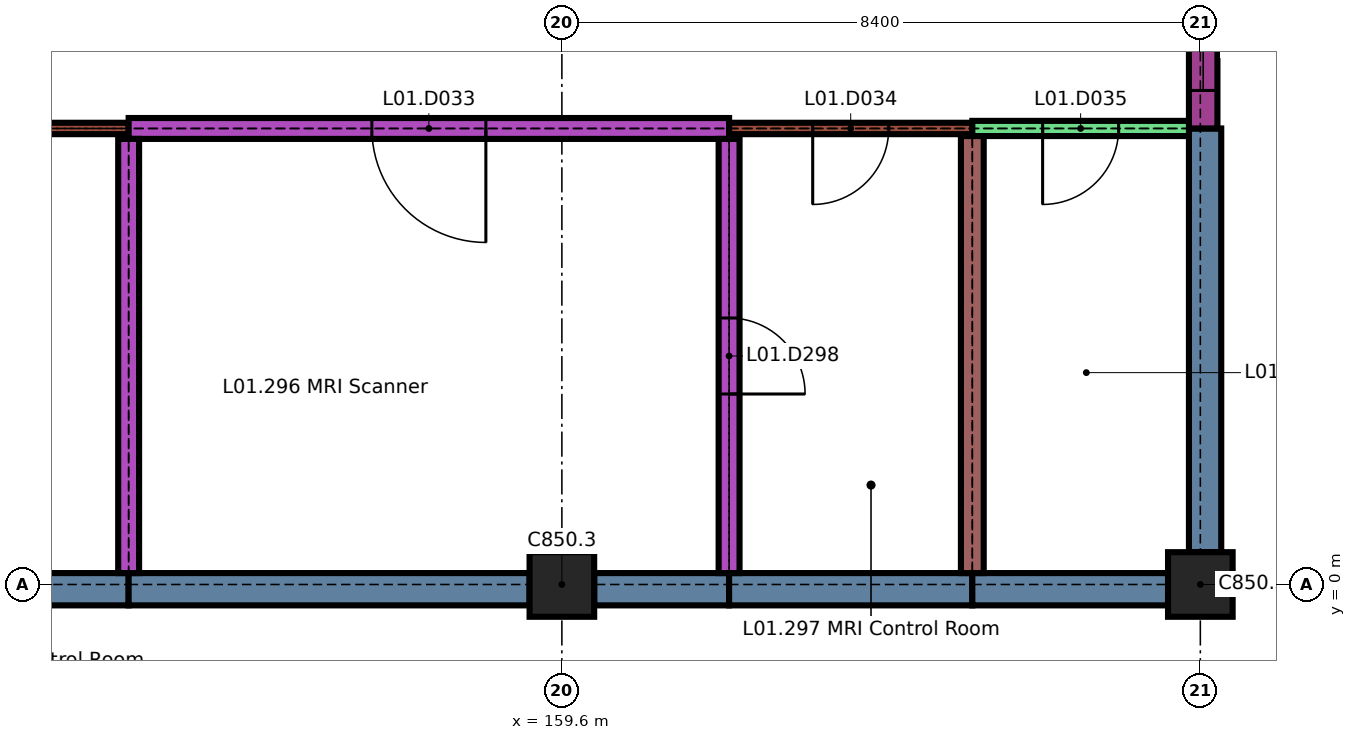
"""IFC4 building model, lengths in metres.
Left out: names, types, materials, properties, quantities, classifications, styles, units other than length and angle.
Written with IfcOpenShell. Run it as: python <this file> out.ifc"""

import sys

from ifc_helpers import new_model, si_unit, direction, frame, frame_2d, origin, origin_2d, place, context, subcontext, project, spatial, rectangle, extrude, element, fill, save


model = new_model("IFC4")
c1 = context("Model", 3, precision=1e-05, world=origin(), true_north=direction((0.0, 1.0)))
c2 = subcontext(c1, "Body", "Model", "MODEL_VIEW")
j1 = project(units=[si_unit("LENGTHUNIT", "METRE"), si_unit("PLANEANGLEUNIT", "RADIAN")], contexts=[c1])
p1 = place(None, origin())
s1 = spatial("IfcSite", under=j1, at=p1, CompositionType="ELEMENT")
p2 = place(p1, origin())
s2 = spatial("IfcBuilding", under=s1, at=p2, CompositionType="ELEMENT")
p3 = place(p2, frame((0.0, 0.0, 4.5)))
s3 = spatial("IfcBuildingStorey", under=s2, at=p3, CompositionType="ELEMENT", Elevation=4.5)
for number, where, z_axis, x_axis in (
    (1, (159.6, 0.0, 0.0), (0.0, 0.0, 1.0), (1.0, 0.0, 0.0)),
    (2, (168.0, 0.0, 0.0), (0.0, 0.0, 1.0), (1.0, 0.0, 0.0)),
):
    element("IfcColumn", number, at=place(p3, frame(where, z_axis=z_axis, x_axis=x_axis)), inside=s3, PredefinedType="COLUMN", context=c2, shape_type="SweptSolid", body=[
        extrude(rectangle(XDim=0.85, YDim=0.85, at=origin_2d()), origin(), (0.0, 0.0, 1.0), 3.45),
    ])
p4 = place(p3, frame((151.625, -0.062, 0.0), z_axis=(0.0, 0.0, 1.0), x_axis=(1.0, 0.0, 0.0)))
e3 = element("IfcWall", 3, at=p4, inside=s3, PredefinedType="SOLIDWALL", context=c2, shape_type="SweptSolid", body=[
    extrude(rectangle(XDim=2.275, YDim=0.425, at=frame_2d((1.137, 0.0))), origin(), (0.0, 0.0, 1.0), 3.15),
])
p5 = place(p3, frame((153.9, -0.062, 0.0), z_axis=(0.0, 0.0, 1.0), x_axis=(1.0, 0.0, 0.0)))
e4 = element("IfcWall", 4, at=p5, inside=s3, PredefinedType="SOLIDWALL", context=c2, shape_type="SweptSolid", body=[
    extrude(rectangle(XDim=5.275, YDim=0.425, at=frame_2d((2.638, 0.0))), origin(), (0.0, 0.0, 1.0), 3.15),
])
p6 = place(p3, frame((160.025, -0.062, 0.0), z_axis=(0.0, 0.0, 1.0), x_axis=(1.0, 0.0, 0.0)))
e5 = element("IfcWall", 5, at=p6, inside=s3, PredefinedType="SOLIDWALL", context=c2, shape_type="SweptSolid", body=[
    extrude(rectangle(XDim=1.775, YDim=0.425, at=frame_2d((0.888, 0.0))), origin(), (0.0, 0.0, 1.0), 3.15),
])
p7 = place(p3, frame((161.8, -0.062, 0.0), z_axis=(0.0, 0.0, 1.0), x_axis=(1.0, 0.0, 0.0)))
e6 = element("IfcWall", 6, at=p7, inside=s3, PredefinedType="SOLIDWALL", context=c2, shape_type="SweptSolid", body=[
    extrude(rectangle(XDim=3.2, YDim=0.425, at=frame_2d((1.6, 0.0))), origin(), (0.0, 0.0, 1.0), 3.15),
])
p8 = place(p3, frame((165.0, -0.062, 0.0), z_axis=(0.0, 0.0, 1.0), x_axis=(1.0, 0.0, 0.0)))
e7 = element("IfcWall", 7, at=p8, inside=s3, PredefinedType="SOLIDWALL", context=c2, shape_type="SweptSolid", body=[
    extrude(rectangle(XDim=2.575, YDim=0.425, at=frame_2d((1.288, 0.0))), origin(), (0.0, 0.0, 1.0), 3.15),
])
p9 = place(p3, frame((168.062, 0.425, 0.0), z_axis=(0.0, 0.0, 1.0), x_axis=(0.0, 1.0, 0.0)))
e8 = element("IfcWall", 8, at=p9, inside=s3, PredefinedType="SOLIDWALL", context=c2, shape_type="SweptSolid", body=[
    extrude(rectangle(XDim=5.575, YDim=0.425, at=frame_2d((2.788, 0.0))), origin(), (0.0, 0.0, 1.0), 3.15),
])
p10 = place(p3, frame((168.038, 6.0, 0.0), z_axis=(0.0, 0.0, 1.0), x_axis=(0.0, 1.0, 0.0)))
e9 = element("IfcWall", 9, at=p10, inside=s3, PredefinedType="SOLIDWALL", context=c2, shape_type="SweptSolid", body=[
    extrude(rectangle(XDim=1.975, YDim=0.375, at=frame_2d((0.988, 0.0))), origin(), (0.0, 0.0, 1.0), 3.15),
])
p11 = place(p10, frame((0.5, 0.0, 0.9)))
e10 = element("IfcOpeningElement", 10, at=p11, cuts=e9, PredefinedType="OPENING", context=c2, shape_type="SweptSolid", body=[
    extrude(rectangle(XDim=1.2, YDim=1.5, at=frame_2d((0.6, 0.75))), frame((0.0, 0.198, 0.0), z_axis=(0.0, -1.0, 0.0), x_axis=(1.0, 0.0, 0.0)), (0.0, 0.0, 1.0), 0.395),
])
p12 = place(p3, frame((150.3, 6.0, 0.0), z_axis=(0.0, 0.0, 1.0), x_axis=(1.0, 0.0, 0.0)))
e11 = element("IfcWall", 11, at=p12, inside=s3, PredefinedType="PARTITIONING", context=c2, shape_type="SweptSolid", body=[
    extrude(rectangle(XDim=3.6, YDim=0.15, at=frame_2d((1.8, 0.0))), origin(), (0.0, 0.0, 1.0), 3.45),
])
p13 = place(p12, frame((1.3, 0.0, 0.0)))
e12 = element("IfcOpeningElement", 12, at=p13, cuts=e11, PredefinedType="OPENING", context=c2, shape_type="SweptSolid", body=[
    extrude(rectangle(XDim=1.0, YDim=2.1, at=frame_2d((0.5, 1.05))), frame((0.0, 0.085, 0.0), z_axis=(0.0, -1.0, 0.0), x_axis=(1.0, 0.0, 0.0)), (0.0, 0.0, 1.0), 0.17),
])
p14 = place(p3, frame((153.9, 6.0, 0.0), z_axis=(0.0, 0.0, 1.0), x_axis=(1.0, 0.0, 0.0)))
e13 = element("IfcWall", 13, at=p14, inside=s3, PredefinedType="SOLIDWALL", context=c2, shape_type="SweptSolid", body=[
    extrude(rectangle(XDim=7.9, YDim=0.275, at=frame_2d((3.95, 0.0))), origin(), (0.0, 0.0, 1.0), 3.45),
])
p15 = place(p14, frame((3.2, 0.0, 0.0)))
e14 = element("IfcOpeningElement", 14, at=p15, cuts=e13, PredefinedType="OPENING", context=c2, shape_type="SweptSolid", body=[
    extrude(rectangle(XDim=1.5, YDim=2.4, at=frame_2d((0.75, 1.2))), frame((0.0, 0.147, 0.0), z_axis=(0.0, -1.0, 0.0), x_axis=(1.0, 0.0, 0.0)), (0.0, 0.0, 1.0), 0.295),
])
p16 = place(p3, frame((161.8, 6.0, 0.0), z_axis=(0.0, 0.0, 1.0), x_axis=(1.0, 0.0, 0.0)))
e15 = element("IfcWall", 15, at=p16, inside=s3, PredefinedType="PARTITIONING", context=c2, shape_type="SweptSolid", body=[
    extrude(rectangle(XDim=3.2, YDim=0.15, at=frame_2d((1.6, 0.0))), origin(), (0.0, 0.0, 1.0), 3.45),
])
p17 = place(p16, frame((1.1, 0.0, 0.0)))
e16 = element("IfcOpeningElement", 16, at=p17, cuts=e15, PredefinedType="OPENING", context=c2, shape_type="SweptSolid", body=[
    extrude(rectangle(XDim=1.0, YDim=2.1, at=frame_2d((0.5, 1.05))), frame((0.0, 0.085, 0.0), z_axis=(0.0, -1.0, 0.0), x_axis=(1.0, 0.0, 0.0)), (0.0, 0.0, 1.0), 0.17),
])
p18 = place(p3, frame((165.0, 6.0, 0.0), z_axis=(0.0, 0.0, 1.0), x_axis=(1.0, 0.0, 0.0)))
e17 = element("IfcWall", 17, at=p18, inside=s3, PredefinedType="SOLIDWALL", context=c2, shape_type="SweptSolid", body=[
    extrude(rectangle(XDim=2.85, YDim=0.2, at=frame_2d((1.425, 0.0))), origin(), (0.0, 0.0, 1.0), 3.45),
])
p19 = place(p18, frame((0.925, 0.0, 0.0)))
e18 = element("IfcOpeningElement", 18, at=p19, cuts=e17, PredefinedType="OPENING", context=c2, shape_type="SweptSolid", body=[
    extrude(rectangle(XDim=1.0, YDim=2.1, at=frame_2d((0.5, 1.05))), frame((0.0, 0.11, 0.0), z_axis=(0.0, -1.0, 0.0), x_axis=(1.0, 0.0, 0.0)), (0.0, 0.0, 1.0), 0.22),
])
p20 = place(p3, frame((153.9, 0.15, 0.0), z_axis=(0.0, 0.0, 1.0), x_axis=(0.0, 1.0, 0.0)))
e19 = element("IfcWall", 19, at=p20, inside=s3, PredefinedType="SOLIDWALL", context=c2, shape_type="SweptSolid", body=[
    extrude(rectangle(XDim=5.713, YDim=0.275, at=frame_2d((2.856, 0.0))), origin(), (0.0, 0.0, 1.0), 3.45),
])
p21 = place(p3, frame((161.8, 0.15, 0.0), z_axis=(0.0, 0.0, 1.0), x_axis=(0.0, 1.0, 0.0)))
e20 = element("IfcWall", 20, at=p21, inside=s3, PredefinedType="SOLIDWALL", context=c2, shape_type="SweptSolid", body=[
    extrude(rectangle(XDim=5.713, YDim=0.275, at=frame_2d((2.856, 0.0))), origin(), (0.0, 0.0, 1.0), 3.45),
])
p22 = place(p21, frame((2.356, 0.0, 0.0)))
e21 = element("IfcOpeningElement", 21, at=p22, cuts=e20, PredefinedType="OPENING", context=c2, shape_type="SweptSolid", body=[
    extrude(rectangle(XDim=1.0, YDim=2.1, at=frame_2d((0.5, 1.05))), frame((0.0, 0.147, 0.0), z_axis=(0.0, -1.0, 0.0), x_axis=(1.0, 0.0, 0.0)), (0.0, 0.0, 1.0), 0.295),
])
p23 = place(p3, frame((165.0, 0.15, 0.0), z_axis=(0.0, 0.0, 1.0), x_axis=(0.0, 1.0, 0.0)))
e22 = element("IfcWall", 22, at=p23, inside=s3, PredefinedType="SOLIDWALL", context=c2, shape_type="SweptSolid", body=[
    extrude(rectangle(XDim=5.75, YDim=0.3, at=frame_2d((2.875, 0.0))), origin(), (0.0, 0.0, 1.0), 3.45),
])
p24 = place(p11, origin())
e23 = element("IfcWindow", 23, at=p24, inside=s3, PartitioningType="SINGLE_PANEL", PredefinedType="WINDOW", context=c2, shape_type="SweptSolid", body=[
    extrude(rectangle(XDim=1.2, YDim=1.5, at=frame_2d((0.6, 0.75))), frame((0.0, 0.03, 0.0), z_axis=(0.0, -1.0, 0.0), x_axis=(1.0, 0.0, 0.0)), (0.0, 0.0, 1.0), 0.06),
])
fill(e10, e23)
p25 = place(p15, origin())
e24 = element("IfcDoor", 24, at=p25, inside=s3, OperationType="SINGLE_SWING_RIGHT", PredefinedType="DOOR", context=c2, shape_type="SweptSolid", body=[
    extrude(rectangle(XDim=1.5, YDim=2.4, at=frame_2d((0.75, 1.2))), frame((0.0, 0.045, 0.0), z_axis=(0.0, -1.0, 0.0), x_axis=(1.0, 0.0, 0.0)), (0.0, 0.0, 1.0), 0.09),
])
fill(e14, e24)
p26 = place(p17, origin())
e25 = element("IfcDoor", 25, at=p26, inside=s3, OperationType="SINGLE_SWING_LEFT", PredefinedType="DOOR", context=c2, shape_type="SweptSolid", body=[
    extrude(rectangle(XDim=1.0, YDim=2.1, at=frame_2d((0.5, 1.05))), frame((0.0, 0.025, 0.0), z_axis=(0.0, -1.0, 0.0), x_axis=(1.0, 0.0, 0.0)), (0.0, 0.0, 1.0), 0.05),
])
fill(e16, e25)
p27 = place(p19, origin())
e26 = element("IfcDoor", 26, at=p27, inside=s3, OperationType="SINGLE_SWING_LEFT", PredefinedType="DOOR", context=c2, shape_type="SweptSolid", body=[
    extrude(rectangle(XDim=1.0, YDim=2.1, at=frame_2d((0.5, 1.05))), frame((0.0, 0.025, 0.0), z_axis=(0.0, -1.0, 0.0), x_axis=(1.0, 0.0, 0.0)), (0.0, 0.0, 1.0), 0.05),
])
fill(e18, e26)
p28 = place(p22, origin())
e27 = element("IfcDoor", 27, at=p28, inside=s3, OperationType="SINGLE_SWING_LEFT", PredefinedType="DOOR", context=c2, shape_type="SweptSolid", body=[
    extrude(rectangle(XDim=1.0, YDim=2.1, at=frame_2d((0.5, 1.05))), frame((0.0, 0.04, 0.0), z_axis=(0.0, -1.0, 0.0), x_axis=(1.0, 0.0, 0.0)), (0.0, 0.0, 1.0), 0.08),
])
fill(e21, e27)
save(model, sys.argv[1])
